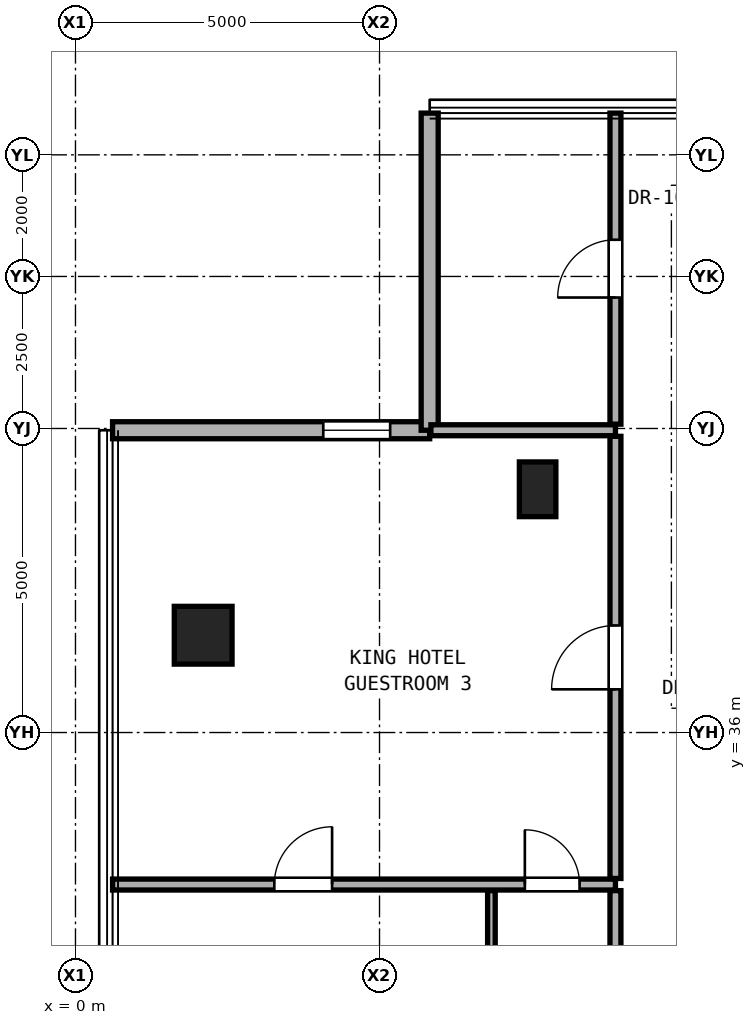
"""IFC4 building model, lengths in metres.
Left out: names, types, materials, properties, quantities, classifications, styles, units other than length and angle.
Written with IfcOpenShell. Run it as: python <this file> out.ifc"""

import sys

from ifc_helpers import new_model, si_unit, direction, frame, frame_2d, origin, origin_2d, place, context, subcontext, project, spatial, rectangle, hollow_rectangle, extrude, element, fill, save


model = new_model("IFC4")
c1 = context("Model", 3, precision=1e-05, world=origin(), true_north=direction((0.0, 1.0)))
c2 = subcontext(c1, "Body", "Model", "MODEL_VIEW")
j1 = project(units=[si_unit("LENGTHUNIT", "METRE"), si_unit("PLANEANGLEUNIT", "RADIAN")], contexts=[c1])
p1 = place(None, origin())
s1 = spatial("IfcSite", under=j1, at=p1, CompositionType="ELEMENT")
p2 = place(p1, origin())
s2 = spatial("IfcBuilding", under=s1, at=p2, CompositionType="ELEMENT")
p3 = place(p2, frame((0.0, 0.0, 190.15)))
s3 = spatial("IfcBuildingStorey", under=s2, at=p3, CompositionType="ELEMENT", Elevation=190.15)
p4 = place(p3, frame((2.1, 37.6, 0.0), z_axis=(0.0, 0.0, 1.0), x_axis=(1.0, 0.0, 0.0)))
e1 = element("IfcColumn", 1, at=p4, inside=s3, PredefinedType="COLUMN", context=c2, shape_type="SweptSolid", body=[
    extrude(hollow_rectangle(XDim=0.95, YDim=0.95, WallThickness=0.05, at=origin_2d()), origin(), (0.0, 0.0, 1.0), 3.25),
])
p5 = place(p3, frame((7.6, 40.0, 0.0), z_axis=(0.0, 0.0, 1.0), x_axis=(1.0, 0.0, 0.0)))
e2 = element("IfcColumn", 2, at=p5, inside=s3, PredefinedType="PILASTER", context=c2, shape_type="SweptSolid", body=[
    extrude(rectangle(XDim=0.6, YDim=0.9, at=origin_2d()), origin(), (0.0, 0.0, 1.0), 3.25),
])
p6 = place(p3, frame((5.825, 40.971, 0.0), z_axis=(0.0, 0.0, 1.0), x_axis=(-1.0, 0.0, 0.0)))
e3 = element("IfcWall", 3, at=p6, inside=s3, PredefinedType="SOLIDWALL", context=c2, shape_type="SweptSolid", body=[
    extrude(rectangle(XDim=5.215, YDim=0.28, at=frame_2d((2.607, 0.0))), origin(), (0.0, 0.0, 1.0), 3.03),
])
p7 = place(p6, frame((0.65, 0.0, 0.85)))
e4 = element("IfcOpeningElement", 4, at=p7, cuts=e3, PredefinedType="OPENING", context=c2, shape_type="SweptSolid", body=[
    extrude(rectangle(XDim=1.1, YDim=2.0, at=frame_2d((0.55, 1.0))), frame((0.0, 0.15, 0.0), z_axis=(0.0, -1.0, 0.0), x_axis=(1.0, 0.0, 0.0)), (0.0, 0.0, 1.0), 0.3),
])
p8 = place(p3, frame((5.825, 46.186, 0.0), z_axis=(0.0, 0.0, 1.0), x_axis=(0.0, -1.0, 0.0)))
e5 = element("IfcWall", 5, at=p8, inside=s3, PredefinedType="SOLIDWALL", context=c2, shape_type="SweptSolid", body=[
    extrude(rectangle(XDim=5.215, YDim=0.28, at=frame_2d((2.607, 0.0))), origin(), (0.0, 0.0, 1.0), 3.03),
])
p9 = place(p3, frame((0.61, 33.5, 0.0), z_axis=(0.0, 0.0, 1.0), x_axis=(1.0, 0.0, 0.0)))
e6 = element("IfcWall", 6, at=p9, inside=s3, PredefinedType="PARTITIONING", context=c2, shape_type="SweptSolid", body=[
    extrude(rectangle(XDim=8.27, YDim=0.18, at=frame_2d((4.135, 0.0))), origin(), (0.0, 0.0, 1.0), 2.269),
])
p10 = place(p9, frame((2.66, 0.0, 0.0)))
e7 = element("IfcOpeningElement", 7, at=p10, cuts=e6, PredefinedType="OPENING", context=c2, shape_type="SweptSolid", body=[
    extrude(rectangle(XDim=0.95, YDim=2.15, at=frame_2d((0.475, 1.075))), frame((0.0, 0.1, 0.0), z_axis=(0.0, -1.0, 0.0), x_axis=(1.0, 0.0, 0.0)), (0.0, 0.0, 1.0), 0.2),
])
p11 = place(p9, frame((6.78, 0.0, 0.0)))
e8 = element("IfcOpeningElement", 8, at=p11, cuts=e6, PredefinedType="OPENING", context=c2, shape_type="SweptSolid", body=[
    extrude(rectangle(XDim=0.9, YDim=2.1, at=frame_2d((0.45, 1.05))), frame((0.0, 0.1, 0.0), z_axis=(0.0, -1.0, 0.0), x_axis=(1.0, 0.0, 0.0)), (0.0, 0.0, 1.0), 0.2),
])
p12 = place(p3, frame((5.845, 40.971, 0.0), z_axis=(0.0, 0.0, 1.0), x_axis=(1.0, 0.0, 0.0)))
e9 = element("IfcWall", 9, at=p12, inside=s3, PredefinedType="PARTITIONING", context=c2, shape_type="SweptSolid", body=[
    extrude(rectangle(XDim=3.035, YDim=0.18, at=frame_2d((1.518, 0.0))), origin(), (0.0, 0.0, 1.0), 3.05),
])
p13 = place(p3, frame((6.84, 31.272, 0.0), z_axis=(0.0, 0.0, 1.0), x_axis=(0.0, 1.0, 0.0)))
e10 = element("IfcWall", 10, at=p13, inside=s3, PredefinedType="PARTITIONING", context=c2, shape_type="SweptSolid", body=[
    extrude(rectangle(XDim=2.127, YDim=0.125, at=frame_2d((1.064, 0.0))), origin(), (0.0, 0.0, 1.0), 2.346),
])
p14 = place(p3, frame((8.88, 31.272, 0.0), z_axis=(0.0, 0.0, 1.0), x_axis=(0.0, 1.0, 0.0)))
e11 = element("IfcWall", 11, at=p14, inside=s3, PredefinedType="PARTITIONING", context=c2, shape_type="SweptSolid", body=[
    extrude(rectangle(XDim=2.127, YDim=0.18, at=frame_2d((1.064, 0.0))), origin(), (0.0, 0.0, 1.0), 2.346),
])
p15 = place(p3, frame((8.88, 33.6, 0.0), z_axis=(0.0, 0.0, 1.0), x_axis=(0.0, 1.0, 0.0)))
e12 = element("IfcWall", 12, at=p15, inside=s3, PredefinedType="PARTITIONING", context=c2, shape_type="SweptSolid", body=[
    extrude(rectangle(XDim=7.271, YDim=0.18, at=frame_2d((3.635, 0.0))), origin(), (0.0, 0.0, 1.0), 2.442),
])
p16 = place(p15, frame((3.111, 0.0, 0.0)))
e13 = element("IfcOpeningElement", 13, at=p16, cuts=e12, PredefinedType="OPENING", context=c2, shape_type="SweptSolid", body=[
    extrude(rectangle(XDim=1.05, YDim=2.2, at=frame_2d((0.525, 1.1))), frame((0.0, 0.1, 0.0), z_axis=(0.0, -1.0, 0.0), x_axis=(1.0, 0.0, 0.0)), (0.0, 0.0, 1.0), 0.2),
])
p17 = place(p3, frame((8.88, 41.071, 0.0), z_axis=(0.0, 0.0, 1.0), x_axis=(0.0, 1.0, 0.0)))
e14 = element("IfcWall", 14, at=p17, inside=s3, PredefinedType="PARTITIONING", context=c2, shape_type="SweptSolid", body=[
    extrude(rectangle(XDim=5.115, YDim=0.18, at=frame_2d((2.558, 0.0))), origin(), (0.0, 0.0, 1.0), 3.05),
])
p18 = place(p17, frame((2.083, 0.0, 0.0)))
e15 = element("IfcOpeningElement", 15, at=p18, cuts=e14, PredefinedType="OPENING", context=c2, shape_type="SweptSolid", body=[
    extrude(rectangle(XDim=0.95, YDim=2.15, at=frame_2d((0.475, 1.075))), frame((0.0, 0.1, 0.0), z_axis=(0.0, -1.0, 0.0), x_axis=(1.0, 0.0, 0.0)), (0.0, 0.0, 1.0), 0.2),
])
p19 = place(p7, origin())
e16 = element("IfcWindow", 16, at=p19, inside=s3, PartitioningType="SINGLE_PANEL", PredefinedType="WINDOW", context=c2, shape_type="SweptSolid", body=[
    extrude(rectangle(XDim=1.1, YDim=2.0, at=frame_2d((0.55, 1.0))), frame((0.0, 0.03, 0.0), z_axis=(0.0, -1.0, 0.0), x_axis=(1.0, 0.0, 0.0)), (0.0, 0.0, 1.0), 0.06),
])
fill(e4, e16)
p20 = place(p16, origin())
e17 = element("IfcDoor", 17, at=p20, inside=s3, OperationType="SINGLE_SWING_LEFT", PredefinedType="DOOR", context=c2, shape_type="SweptSolid", body=[
    extrude(rectangle(XDim=1.05, YDim=2.2, at=frame_2d((0.525, 1.1))), frame((0.0, 0.025, 0.0), z_axis=(0.0, -1.0, 0.0), x_axis=(1.0, 0.0, 0.0)), (0.0, 0.0, 1.0), 0.05),
])
fill(e13, e17)
p21 = place(p10, origin())
e18 = element("IfcDoor", 18, at=p21, inside=s3, OperationType="SINGLE_SWING_RIGHT", PredefinedType="DOOR", context=c2, shape_type="SweptSolid", body=[
    extrude(rectangle(XDim=0.95, YDim=2.15, at=frame_2d((0.475, 1.075))), frame((0.0, 0.025, 0.0), z_axis=(0.0, -1.0, 0.0), x_axis=(1.0, 0.0, 0.0)), (0.0, 0.0, 1.0), 0.05),
])
fill(e7, e18)
p22 = place(p11, origin())
e19 = element("IfcDoor", 19, at=p22, inside=s3, OperationType="SINGLE_SWING_LEFT", PredefinedType="DOOR", context=c2, shape_type="SweptSolid", body=[
    extrude(rectangle(XDim=0.9, YDim=2.1, at=frame_2d((0.45, 1.05))), frame((0.0, 0.025, 0.0), z_axis=(0.0, -1.0, 0.0), x_axis=(1.0, 0.0, 0.0)), (0.0, 0.0, 1.0), 0.05),
])
fill(e8, e19)
p23 = place(p18, origin())
e20 = element("IfcDoor", 20, at=p23, inside=s3, OperationType="SINGLE_SWING_LEFT", PredefinedType="DOOR", context=c2, shape_type="SweptSolid", body=[
    extrude(rectangle(XDim=0.95, YDim=2.15, at=frame_2d((0.475, 1.075))), frame((0.0, 0.025, 0.0), z_axis=(0.0, -1.0, 0.0), x_axis=(1.0, 0.0, 0.0)), (0.0, 0.0, 1.0), 0.05),
])
fill(e15, e20)
save(model, sys.argv[1])
